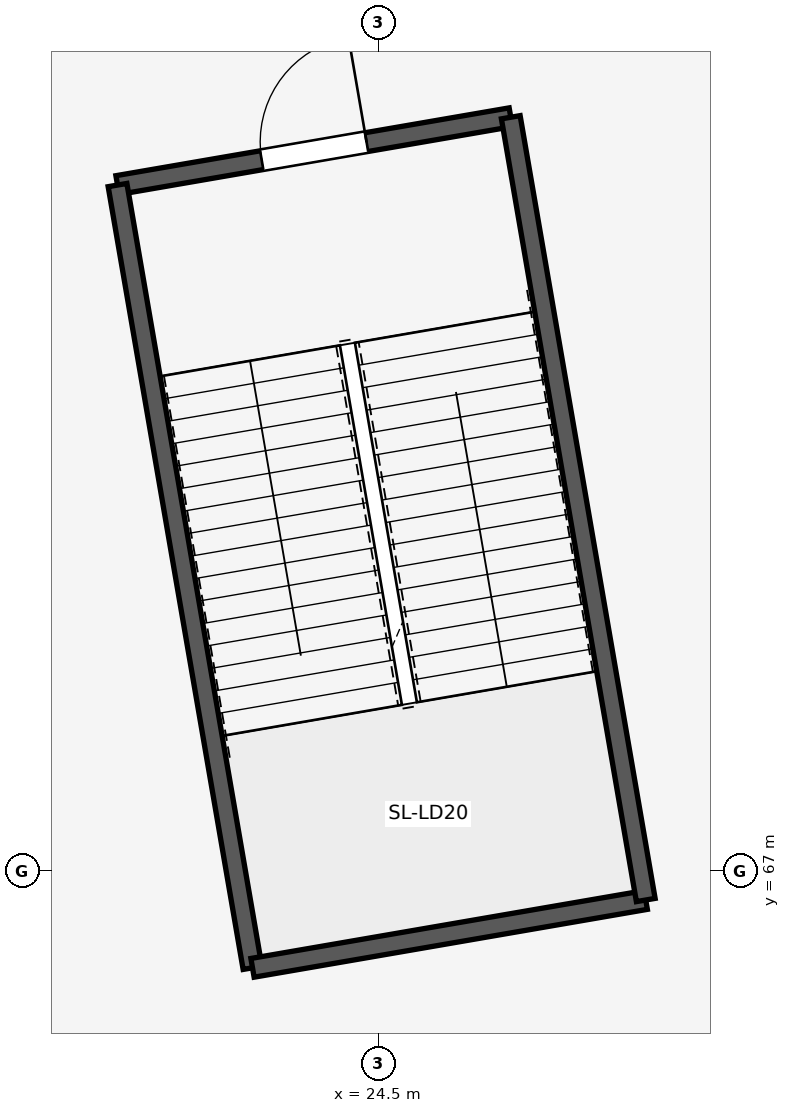
"""IFC4 building model, lengths in metres.
Left out: names, types, materials, properties, quantities, classifications, styles, units other than length and angle.
Written with IfcOpenShell. Run it as: python <this file> out.ifc"""

import sys

from ifc_helpers import new_model, si_unit, direction, frame, frame_2d, origin, place, context, subcontext, project, spatial, rectangle, extrude, element, fill, save


model = new_model("IFC4")
c1 = context("Model", 3, precision=1e-05, world=origin(), true_north=direction((0.0, 1.0)))
c2 = subcontext(c1, "Body", "Model", "MODEL_VIEW")
j1 = project(units=[si_unit("LENGTHUNIT", "METRE"), si_unit("PLANEANGLEUNIT", "RADIAN")], contexts=[c1])
p1 = place(None, origin())
s1 = spatial("IfcSite", under=j1, at=p1, CompositionType="ELEMENT")
p2 = place(p1, origin())
s2 = spatial("IfcBuilding", under=s1, at=p2, CompositionType="ELEMENT")
p3 = place(p2, origin())
s3 = spatial("IfcBuildingStorey", under=s2, at=p3, CompositionType="ELEMENT", Elevation=0.0)
p4 = place(p3, frame((26.238, 76.923, 0.0), z_axis=(0.0, 0.0, 1.0), x_axis=(-0.985457162135, -0.16992404655, 0.0)))
e1 = element("IfcWall", 1, at=p4, inside=s3, PredefinedType="SHEAR", context=c2, shape_type="SweptSolid", body=[
    extrude(rectangle(XDim=5.25, YDim=0.25, at=frame_2d((2.625, 0.0))), origin(), (0.0, 0.0, 1.0), 4.94),
])
p5 = place(p4, frame((1.925, 0.0, 0.0)))
e2 = element("IfcOpeningElement", 2, at=p5, cuts=e1, PredefinedType="OPENING", context=c2, shape_type="SweptSolid", body=[
    extrude(rectangle(XDim=1.4, YDim=2.2, at=frame_2d((0.7, 1.1))), frame((0.0, 0.135, 0.0), z_axis=(0.0, -1.0, 0.0), x_axis=(1.0, 0.0, 0.0)), (0.0, 0.0, 1.0), 0.27),
])
p6 = place(p3, frame((21.064, 76.031, 0.0), z_axis=(0.0, 0.0, 1.0), x_axis=(0.169938992676, -0.985454584833, 0.0)))
e3 = element("IfcWall", 3, at=p6, inside=s3, PredefinedType="SHEAR", context=c2, shape_type="SweptSolid", body=[
    extrude(rectangle(XDim=10.45, YDim=0.25, at=frame_2d((5.225, 0.0))), origin(), (0.0, 0.0, 1.0), 4.94),
])
p7 = place(p3, frame((22.84, 65.733, 0.0), z_axis=(0.0, 0.0, 1.0), x_axis=(0.985457162135, 0.16992404655, 0.0)))
e4 = element("IfcWall", 4, at=p7, inside=s3, PredefinedType="SHEAR", context=c2, shape_type="SweptSolid", body=[
    extrude(rectangle(XDim=5.25, YDim=0.25, at=frame_2d((2.625, 0.0))), origin(), (0.0, 0.0, 1.0), 4.94),
])
p8 = place(p3, frame((28.013, 66.625, 0.0), z_axis=(0.0, 0.0, 1.0), x_axis=(-0.169938992676, 0.985454584833, 0.0)))
e5 = element("IfcWall", 5, at=p8, inside=s3, PredefinedType="SHEAR", context=c2, shape_type="SweptSolid", body=[
    extrude(rectangle(XDim=10.45, YDim=0.25, at=frame_2d((5.225, 0.0))), origin(), (0.0, 0.0, 1.0), 4.94),
])
p9 = place(p5, frame((1.4, 0.0, 0.0), z_axis=(0.0, 0.0, 1.0), x_axis=(-1.0, 0.0, 0.0)))
e6 = element("IfcDoor", 6, at=p9, inside=s3, OperationType="SINGLE_SWING_RIGHT", PredefinedType="DOOR", context=c2, shape_type="SweptSolid", body=[
    extrude(rectangle(XDim=1.4, YDim=2.2, at=frame_2d((0.7, 1.1))), frame((0.0, 0.025, 0.0), z_axis=(0.0, -1.0, 0.0), x_axis=(1.0, 0.0, 0.0)), (0.0, 0.0, 1.0), 0.05),
])
fill(e2, e6)
save(model, sys.argv[1])
